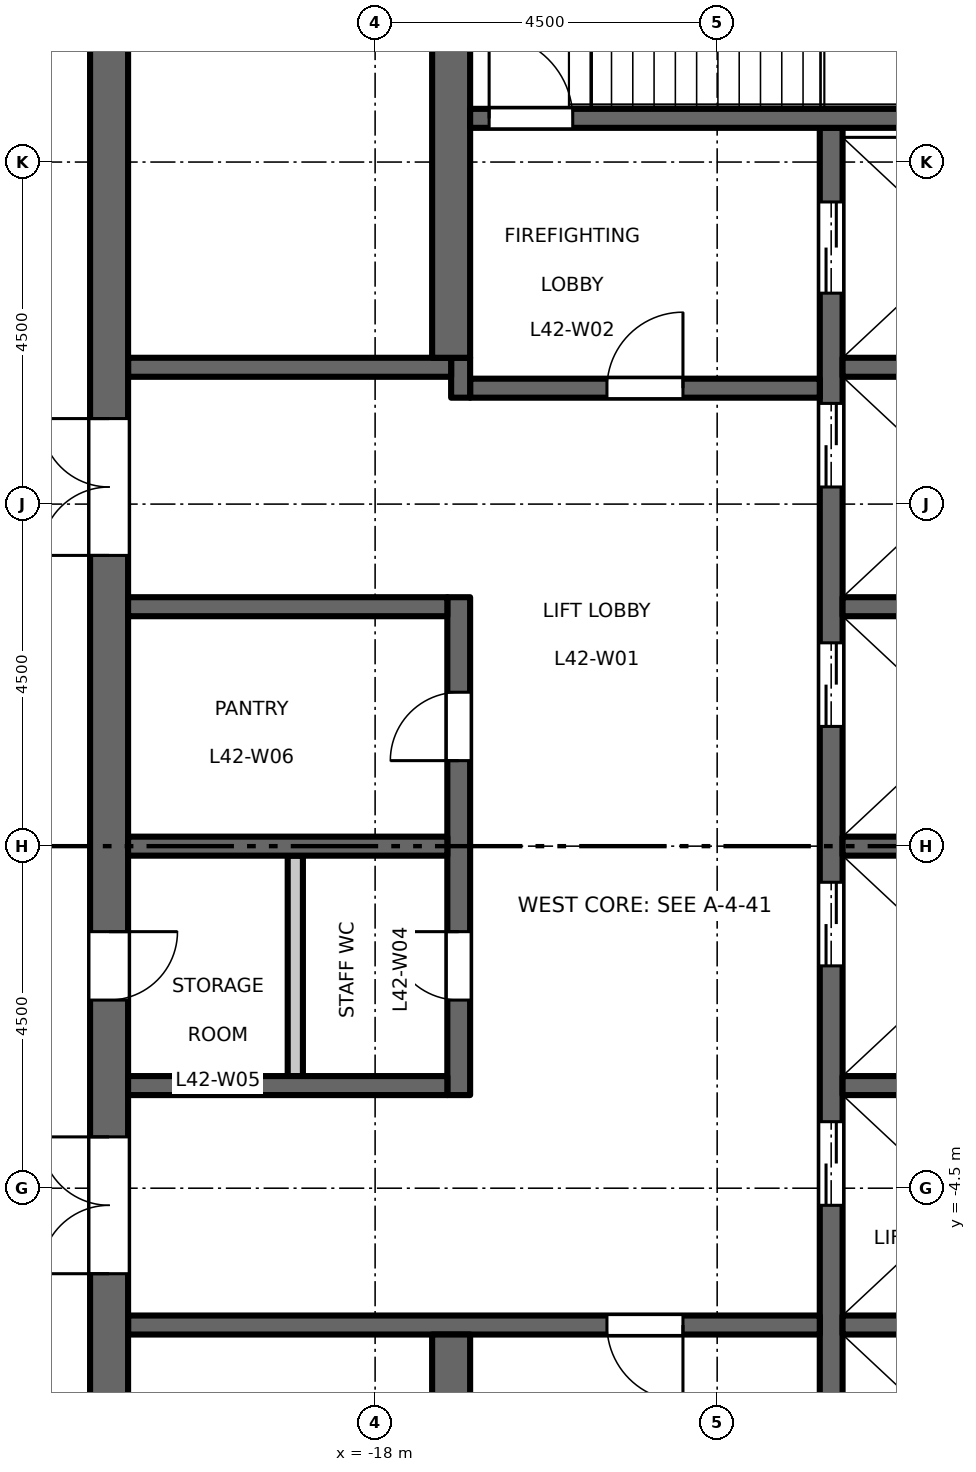
"""IFC4 building model, lengths in metres.
Left out: names, types, materials, properties, quantities, classifications, styles, units other than length and angle.
Written with IfcOpenShell. Run it as: python <this file> out.ifc"""

import sys

from ifc_helpers import new_model, si_unit, direction, frame, frame_2d, origin, place, context, subcontext, project, spatial, rectangle, extrude, element, fill, save


model = new_model("IFC4")
c1 = context("Model", 3, precision=1e-05, world=origin(), true_north=direction((0.0, 1.0)))
c2 = subcontext(c1, "Body", "Model", "MODEL_VIEW")
j1 = project(units=[si_unit("LENGTHUNIT", "METRE"), si_unit("PLANEANGLEUNIT", "RADIAN")], contexts=[c1])
p1 = place(None, origin())
s1 = spatial("IfcSite", under=j1, at=p1, CompositionType="ELEMENT")
p2 = place(p1, origin())
s2 = spatial("IfcBuilding", under=s1, at=p2, CompositionType="ELEMENT")
p3 = place(p2, frame((0.0, 0.0, 197.2)))
s3 = spatial("IfcBuildingStorey", under=s2, at=p3, CompositionType="ELEMENT", Elevation=197.2)
p4 = place(p3, frame((-12.0, -9.45, 0.0), z_axis=(0.0, 0.0, 1.0), x_axis=(0.0, 1.0, 0.0)))
e1 = element("IfcWall", 1, at=p4, inside=s3, PredefinedType="SHEAR", context=c2, shape_type="SweptSolid", body=[
    extrude(rectangle(XDim=18.9, YDim=0.3, at=frame_2d((9.45, 0.0))), origin(), (0.0, 0.0, 1.0), 4.35),
])
p5 = place(p4, frame((4.725, 0.0, 0.0)))
e2 = element("IfcOpeningElement", 2, at=p5, cuts=e1, PredefinedType="OPENING", context=c2, shape_type="SweptSolid", body=[
    extrude(rectangle(XDim=1.1, YDim=2.1, at=frame_2d((0.55, 1.05))), frame((0.0, 0.16, 0.0), z_axis=(0.0, -1.0, 0.0), x_axis=(1.0, 0.0, 0.0)), (0.0, 0.0, 1.0), 0.32),
])
p6 = place(p4, frame((7.875, 0.0, 0.0)))
e3 = element("IfcOpeningElement", 3, at=p6, cuts=e1, PredefinedType="OPENING", context=c2, shape_type="SweptSolid", body=[
    extrude(rectangle(XDim=1.1, YDim=2.1, at=frame_2d((0.55, 1.05))), frame((0.0, 0.16, 0.0), z_axis=(0.0, -1.0, 0.0), x_axis=(1.0, 0.0, 0.0)), (0.0, 0.0, 1.0), 0.32),
])
p7 = place(p4, frame((11.025, 0.0, 0.0)))
e4 = element("IfcOpeningElement", 4, at=p7, cuts=e1, PredefinedType="OPENING", context=c2, shape_type="SweptSolid", body=[
    extrude(rectangle(XDim=1.1, YDim=2.1, at=frame_2d((0.55, 1.05))), frame((0.0, 0.16, 0.0), z_axis=(0.0, -1.0, 0.0), x_axis=(1.0, 0.0, 0.0)), (0.0, 0.0, 1.0), 0.32),
])
p8 = place(p4, frame((14.175, 0.0, 0.0)))
e5 = element("IfcOpeningElement", 5, at=p8, cuts=e1, PredefinedType="OPENING", context=c2, shape_type="SweptSolid", body=[
    extrude(rectangle(XDim=1.1, YDim=2.1, at=frame_2d((0.55, 1.05))), frame((0.0, 0.16, 0.0), z_axis=(0.0, -1.0, 0.0), x_axis=(1.0, 0.0, 0.0)), (0.0, 0.0, 1.0), 0.32),
])
p9 = place(p4, frame((16.725, 0.0, 0.0)))
e6 = element("IfcOpeningElement", 6, at=p9, cuts=e1, PredefinedType="OPENING", context=c2, shape_type="SweptSolid", body=[
    extrude(rectangle(XDim=1.2, YDim=2.1, at=frame_2d((0.6, 1.05))), frame((0.0, 0.16, 0.0), z_axis=(0.0, -1.0, 0.0), x_axis=(1.0, 0.0, 0.0)), (0.0, 0.0, 1.0), 0.32),
])
p10 = place(p4, frame((0.975, 0.0, 0.0)))
e7 = element("IfcOpeningElement", 7, at=p10, cuts=e1, PredefinedType="OPENING", context=c2, shape_type="SweptSolid", body=[
    extrude(rectangle(XDim=1.2, YDim=2.1, at=frame_2d((0.6, 1.05))), frame((0.0, 0.16, 0.0), z_axis=(0.0, -1.0, 0.0), x_axis=(1.0, 0.0, 0.0)), (0.0, 0.0, 1.0), 0.32),
])
p11 = place(p3, frame((-12.15, 6.025, 0.0), z_axis=(0.0, 0.0, 1.0), x_axis=(-1.0, 0.0, 0.0)))
e8 = element("IfcWall", 8, at=p11, inside=s3, PredefinedType="SHEAR", context=c2, shape_type="SweptSolid", body=[
    extrude(rectangle(XDim=4.6, YDim=0.25, at=frame_2d((2.3, 0.0))), origin(), (0.0, 0.0, 1.0), 4.35),
])
p12 = place(p11, frame((1.8, 0.0, 0.0)))
e9 = element("IfcOpeningElement", 9, at=p12, cuts=e8, PredefinedType="OPENING", context=c2, shape_type="SweptSolid", body=[
    extrude(rectangle(XDim=1.0, YDim=2.1, at=frame_2d((0.5, 1.05))), frame((0.0, 0.135, 0.0), z_axis=(0.0, -1.0, 0.0), x_axis=(1.0, 0.0, 0.0)), (0.0, 0.0, 1.0), 0.27),
])
p13 = place(p3, frame((-16.875, 5.9, 0.0), z_axis=(0.0, 0.0, 1.0), x_axis=(0.0, 1.0, 0.0)))
e10 = element("IfcWall", 10, at=p13, inside=s3, PredefinedType="SHEAR", context=c2, shape_type="SweptSolid", body=[
    extrude(rectangle(XDim=0.525, YDim=0.25, at=frame_2d((0.263, 0.0))), origin(), (0.0, 0.0, 1.0), 4.35),
])
p14 = place(p3, frame((-17.0, 6.3, 0.0), z_axis=(0.0, 0.0, 1.0), x_axis=(-1.0, 0.0, 0.0)))
e11 = element("IfcWall", 11, at=p14, inside=s3, PredefinedType="SHEAR", context=c2, shape_type="SweptSolid", body=[
    extrude(rectangle(XDim=4.25, YDim=0.25, at=frame_2d((2.125, 0.0))), origin(), (0.0, 0.0, 1.0), 4.35),
])
p15 = place(p3, frame((-12.15, -6.3, 0.0), z_axis=(0.0, 0.0, 1.0), x_axis=(-1.0, 0.0, 0.0)))
e12 = element("IfcWall", 12, at=p15, inside=s3, PredefinedType="SHEAR", context=c2, shape_type="SweptSolid", body=[
    extrude(rectangle(XDim=9.1, YDim=0.25, at=frame_2d((4.55, 0.0))), origin(), (0.0, 0.0, 1.0), 4.35),
])
p16 = place(p15, frame((1.8, 0.0, 0.0)))
e13 = element("IfcOpeningElement", 13, at=p16, cuts=e12, PredefinedType="OPENING", context=c2, shape_type="SweptSolid", body=[
    extrude(rectangle(XDim=1.0, YDim=2.1, at=frame_2d((0.5, 1.05))), frame((0.0, 0.135, 0.0), z_axis=(0.0, -1.0, 0.0), x_axis=(1.0, 0.0, 0.0)), (0.0, 0.0, 1.0), 0.27),
])
p17 = place(p3, frame((-21.5, -13.0, 0.0), z_axis=(0.0, 0.0, 1.0), x_axis=(0.0, 1.0, 0.0)))
e14 = element("IfcWall", 14, at=p17, inside=s3, PredefinedType="SHEAR", context=c2, shape_type="SweptSolid", body=[
    extrude(rectangle(XDim=26.0, YDim=0.5, at=frame_2d((13.0, 0.0))), origin(), (0.0, 0.0, 1.0), 4.35),
])
p18 = place(p17, frame((16.825, 0.0, 0.0)))
e15 = element("IfcOpeningElement", 15, at=p18, cuts=e14, PredefinedType="OPENING", context=c2, shape_type="SweptSolid", body=[
    extrude(rectangle(XDim=1.8, YDim=2.1, at=frame_2d((0.9, 1.05))), frame((0.0, 0.26, 0.0), z_axis=(0.0, -1.0, 0.0), x_axis=(1.0, 0.0, 0.0)), (0.0, 0.0, 1.0), 0.52),
])
p19 = place(p17, frame((7.375, 0.0, 0.0)))
e16 = element("IfcOpeningElement", 16, at=p19, cuts=e14, PredefinedType="OPENING", context=c2, shape_type="SweptSolid", body=[
    extrude(rectangle(XDim=1.8, YDim=2.1, at=frame_2d((0.9, 1.05))), frame((0.0, 0.26, 0.0), z_axis=(0.0, -1.0, 0.0), x_axis=(1.0, 0.0, 0.0)), (0.0, 0.0, 1.0), 0.52),
])
p20 = place(p17, frame((10.975, 0.0, 0.0)))
e17 = element("IfcOpeningElement", 17, at=p20, cuts=e14, PredefinedType="OPENING", context=c2, shape_type="SweptSolid", body=[
    extrude(rectangle(XDim=0.9, YDim=2.1, at=frame_2d((0.45, 1.05))), frame((0.0, 0.26, 0.0), z_axis=(0.0, -1.0, 0.0), x_axis=(1.0, 0.0, 0.0)), (0.0, 0.0, 1.0), 0.52),
])
p21 = place(p3, frame((-16.9, -3.275, 0.0), z_axis=(0.0, 0.0, 1.0), x_axis=(0.0, 1.0, 0.0)))
e18 = element("IfcWall", 18, at=p21, inside=s3, PredefinedType="SHEAR", context=c2, shape_type="SweptSolid", body=[
    extrude(rectangle(XDim=6.55, YDim=0.3, at=frame_2d((3.275, 0.0))), origin(), (0.0, 0.0, 1.0), 4.35),
])
p22 = place(p21, frame((1.25, 0.0, 0.0)))
e19 = element("IfcOpeningElement", 19, at=p22, cuts=e18, PredefinedType="OPENING", context=c2, shape_type="SweptSolid", body=[
    extrude(rectangle(XDim=0.9, YDim=2.1, at=frame_2d((0.45, 1.05))), frame((0.0, 0.16, 0.0), z_axis=(0.0, -1.0, 0.0), x_axis=(1.0, 0.0, 0.0)), (0.0, 0.0, 1.0), 0.32),
])
p23 = place(p21, frame((4.4, 0.0, 0.0)))
e20 = element("IfcOpeningElement", 20, at=p23, cuts=e18, PredefinedType="OPENING", context=c2, shape_type="SweptSolid", body=[
    extrude(rectangle(XDim=0.9, YDim=2.1, at=frame_2d((0.45, 1.05))), frame((0.0, 0.16, 0.0), z_axis=(0.0, -1.0, 0.0), x_axis=(1.0, 0.0, 0.0)), (0.0, 0.0, 1.0), 0.32),
])
for number, where, z_axis, x_axis in (
    (21, (-17.05, 0.0, 0.0), (0.0, 0.0, 1.0), (-1.0, 0.0, 0.0)),
    (22, (-17.05, 3.15, 0.0), (0.0, 0.0, 1.0), (-1.0, 0.0, 0.0)),
    (23, (-17.05, -3.15, 0.0), (0.0, 0.0, 1.0), (-1.0, 0.0, 0.0)),
):
    element("IfcWall", number, at=place(p3, frame(where, z_axis=z_axis, x_axis=x_axis)), inside=s3, PredefinedType="SHEAR", context=c2, shape_type="SweptSolid", body=[
        extrude(rectangle(XDim=4.2, YDim=0.25, at=frame_2d((2.1, 0.0))), origin(), (0.0, 0.0, 1.0), 4.35),
    ])
p24 = place(p3, frame((-19.05, -3.025, 0.0), z_axis=(0.0, 0.0, 1.0), x_axis=(0.0, 1.0, 0.0)))
e24 = element("IfcWall", 24, at=p24, inside=s3, PredefinedType="PARTITIONING", context=c2, shape_type="SweptSolid", body=[
    extrude(rectangle(XDim=2.9, YDim=0.2, at=frame_2d((1.45, 0.0))), origin(), (0.0, 0.0, 1.0), 4.35),
])
for number, where, z_axis, x_axis in (
    (25, (-17.0, 6.425, 0.0), (0.0, 0.0, 1.0), (0.0, 1.0, 0.0)),
    (26, (-17.0, -13.0, 0.0), (0.0, 0.0, 1.0), (0.0, 1.0, 0.0)),
):
    element("IfcWall", number, at=place(p3, frame(where, z_axis=z_axis, x_axis=x_axis)), inside=s3, PredefinedType="SHEAR", context=c2, shape_type="SweptSolid", body=[
        extrude(rectangle(XDim=6.575, YDim=0.5, at=frame_2d((3.288, 0.0))), origin(), (0.0, 0.0, 1.0), 4.35),
    ])
for number, where, z_axis, x_axis in (
    (27, (-8.75, 0.0, 0.0), (0.0, 0.0, 1.0), (-1.0, 0.0, 0.0)),
    (28, (-8.75, 3.15, 0.0), (0.0, 0.0, 1.0), (-1.0, 0.0, 0.0)),
    (29, (-8.75, 6.3, 0.0), (0.0, 0.0, 1.0), (-1.0, 0.0, 0.0)),
    (30, (-8.75, -3.15, 0.0), (0.0, 0.0, 1.0), (-1.0, 0.0, 0.0)),
    (31, (-8.75, -6.3, 0.0), (0.0, 0.0, 1.0), (-1.0, 0.0, 0.0)),
):
    element("IfcWall", number, at=place(p3, frame(where, z_axis=z_axis, x_axis=x_axis)), inside=s3, PredefinedType="SHEAR", context=c2, shape_type="SweptSolid", body=[
        extrude(rectangle(XDim=3.1, YDim=0.25, at=frame_2d((1.55, 0.0))), origin(), (0.0, 0.0, 1.0), 4.35),
    ])
p25 = place(p3, frame((-8.75, 9.575, 0.0), z_axis=(0.0, 0.0, 1.0), x_axis=(-1.0, 0.0, 0.0)))
e32 = element("IfcWall", 32, at=p25, inside=s3, PredefinedType="SHEAR", context=c2, shape_type="SweptSolid", body=[
    extrude(rectangle(XDim=8.0, YDim=0.25, at=frame_2d((4.0, 0.0))), origin(), (0.0, 0.0, 1.0), 4.35),
])
p26 = place(p25, frame((6.65, 0.0, 0.0)))
e33 = element("IfcOpeningElement", 33, at=p26, cuts=e32, PredefinedType="OPENING", context=c2, shape_type="SweptSolid", body=[
    extrude(rectangle(XDim=1.1, YDim=2.1, at=frame_2d((0.55, 1.05))), frame((0.0, 0.135, 0.0), z_axis=(0.0, -1.0, 0.0), x_axis=(1.0, 0.0, 0.0)), (0.0, 0.0, 1.0), 0.27),
])
p27 = place(p12, origin())
e34 = element("IfcDoor", 34, at=p27, inside=s3, OperationType="SINGLE_SWING_LEFT", PredefinedType="DOOR", context=c2, shape_type="SweptSolid", body=[
    extrude(rectangle(XDim=1.0, YDim=2.1, at=frame_2d((0.5, 1.05))), frame((0.0, 0.025, 0.0), z_axis=(0.0, -1.0, 0.0), x_axis=(1.0, 0.0, 0.0)), (0.0, 0.0, 1.0), 0.05),
])
fill(e9, e34)
p28 = place(p16, origin())
e35 = element("IfcDoor", 35, at=p28, inside=s3, OperationType="SINGLE_SWING_RIGHT", PredefinedType="DOOR", context=c2, shape_type="SweptSolid", body=[
    extrude(rectangle(XDim=1.0, YDim=2.1, at=frame_2d((0.5, 1.05))), frame((0.0, 0.025, 0.0), z_axis=(0.0, -1.0, 0.0), x_axis=(1.0, 0.0, 0.0)), (0.0, 0.0, 1.0), 0.05),
])
fill(e13, e35)
p29 = place(p26, origin())
e36 = element("IfcDoor", 36, at=p29, inside=s3, OperationType="SINGLE_SWING_RIGHT", PredefinedType="DOOR", context=c2, shape_type="SweptSolid", body=[
    extrude(rectangle(XDim=1.1, YDim=2.1, at=frame_2d((0.55, 1.05))), frame((0.0, 0.025, 0.0), z_axis=(0.0, -1.0, 0.0), x_axis=(1.0, 0.0, 0.0)), (0.0, 0.0, 1.0), 0.05),
])
fill(e33, e36)
p30 = place(p18, origin())
e37 = element("IfcDoor", 37, at=p30, inside=s3, OperationType="DOUBLE_DOOR_DOUBLE_SWING", PredefinedType="DOOR", context=c2, shape_type="SweptSolid", body=[
    extrude(rectangle(XDim=1.8, YDim=2.1, at=frame_2d((0.9, 1.05))), frame((0.0, 0.025, 0.0), z_axis=(0.0, -1.0, 0.0), x_axis=(1.0, 0.0, 0.0)), (0.0, 0.0, 1.0), 0.05),
])
fill(e15, e37)
p31 = place(p19, origin())
e38 = element("IfcDoor", 38, at=p31, inside=s3, OperationType="DOUBLE_DOOR_DOUBLE_SWING", PredefinedType="DOOR", context=c2, shape_type="SweptSolid", body=[
    extrude(rectangle(XDim=1.8, YDim=2.1, at=frame_2d((0.9, 1.05))), frame((0.0, 0.025, 0.0), z_axis=(0.0, -1.0, 0.0), x_axis=(1.0, 0.0, 0.0)), (0.0, 0.0, 1.0), 0.05),
])
fill(e16, e38)
p32 = place(p5, origin())
e39 = element("IfcDoor", 39, at=p32, inside=s3, OperationType="DOUBLE_DOOR_SLIDING", PredefinedType="DOOR", context=c2, shape_type="SweptSolid", body=[
    extrude(rectangle(XDim=1.1, YDim=2.1, at=frame_2d((0.55, 1.05))), frame((0.0, 0.025, 0.0), z_axis=(0.0, -1.0, 0.0), x_axis=(1.0, 0.0, 0.0)), (0.0, 0.0, 1.0), 0.05),
])
fill(e2, e39)
p33 = place(p6, origin())
e40 = element("IfcDoor", 40, at=p33, inside=s3, OperationType="DOUBLE_DOOR_SLIDING", PredefinedType="DOOR", context=c2, shape_type="SweptSolid", body=[
    extrude(rectangle(XDim=1.1, YDim=2.1, at=frame_2d((0.55, 1.05))), frame((0.0, 0.025, 0.0), z_axis=(0.0, -1.0, 0.0), x_axis=(1.0, 0.0, 0.0)), (0.0, 0.0, 1.0), 0.05),
])
fill(e3, e40)
p34 = place(p7, origin())
e41 = element("IfcDoor", 41, at=p34, inside=s3, OperationType="DOUBLE_DOOR_SLIDING", PredefinedType="DOOR", context=c2, shape_type="SweptSolid", body=[
    extrude(rectangle(XDim=1.1, YDim=2.1, at=frame_2d((0.55, 1.05))), frame((0.0, 0.025, 0.0), z_axis=(0.0, -1.0, 0.0), x_axis=(1.0, 0.0, 0.0)), (0.0, 0.0, 1.0), 0.05),
])
fill(e4, e41)
p35 = place(p8, origin())
e42 = element("IfcDoor", 42, at=p35, inside=s3, OperationType="DOUBLE_DOOR_SLIDING", PredefinedType="DOOR", context=c2, shape_type="SweptSolid", body=[
    extrude(rectangle(XDim=1.1, YDim=2.1, at=frame_2d((0.55, 1.05))), frame((0.0, 0.025, 0.0), z_axis=(0.0, -1.0, 0.0), x_axis=(1.0, 0.0, 0.0)), (0.0, 0.0, 1.0), 0.05),
])
fill(e5, e42)
p36 = place(p9, origin())
e43 = element("IfcDoor", 43, at=p36, inside=s3, OperationType="DOUBLE_DOOR_SLIDING", PredefinedType="DOOR", context=c2, shape_type="SweptSolid", body=[
    extrude(rectangle(XDim=1.2, YDim=2.1, at=frame_2d((0.6, 1.05))), frame((0.0, 0.025, 0.0), z_axis=(0.0, -1.0, 0.0), x_axis=(1.0, 0.0, 0.0)), (0.0, 0.0, 1.0), 0.05),
])
fill(e6, e43)
p37 = place(p22, origin())
e44 = element("IfcDoor", 44, at=p37, inside=s3, OperationType="SINGLE_SWING_LEFT", PredefinedType="DOOR", context=c2, shape_type="SweptSolid", body=[
    extrude(rectangle(XDim=0.9, YDim=2.1, at=frame_2d((0.45, 1.05))), frame((0.0, 0.025, 0.0), z_axis=(0.0, -1.0, 0.0), x_axis=(1.0, 0.0, 0.0)), (0.0, 0.0, 1.0), 0.05),
])
fill(e19, e44)
p38 = place(p20, origin())
e45 = element("IfcDoor", 45, at=p38, inside=s3, OperationType="SINGLE_SWING_RIGHT", PredefinedType="DOOR", context=c2, shape_type="SweptSolid", body=[
    extrude(rectangle(XDim=0.9, YDim=2.1, at=frame_2d((0.45, 1.05))), frame((0.0, 0.025, 0.0), z_axis=(0.0, -1.0, 0.0), x_axis=(1.0, 0.0, 0.0)), (0.0, 0.0, 1.0), 0.05),
])
fill(e17, e45)
p39 = place(p23, origin())
e46 = element("IfcDoor", 46, at=p39, inside=s3, OperationType="SINGLE_SWING_RIGHT", PredefinedType="DOOR", context=c2, shape_type="SweptSolid", body=[
    extrude(rectangle(XDim=0.9, YDim=2.1, at=frame_2d((0.45, 1.05))), frame((0.0, 0.025, 0.0), z_axis=(0.0, -1.0, 0.0), x_axis=(1.0, 0.0, 0.0)), (0.0, 0.0, 1.0), 0.05),
])
fill(e20, e46)
save(model, sys.argv[1])
